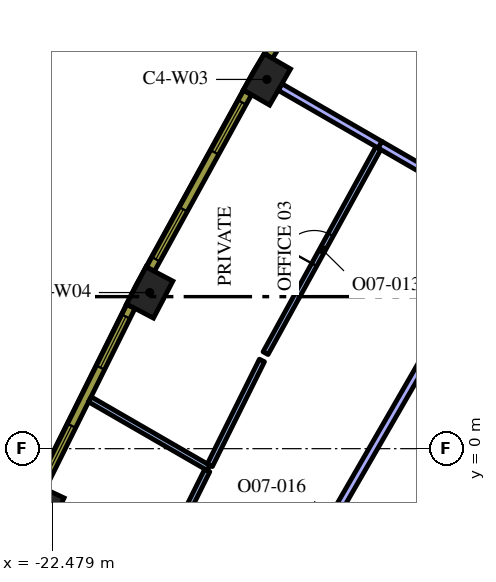
"""IFC4 building model, lengths in metres.
Left out: names, types, materials, properties, quantities, classifications, styles, units other than length and angle.
Written with IfcOpenShell. Run it as: python <this file> out.ifc"""

import sys

from ifc_helpers import new_model, si_unit, direction, frame, frame_2d, origin, origin_2d, place, context, subcontext, project, spatial, rectangle, extrude, element, fill, save


model = new_model("IFC4")
c1 = context("Model", 3, precision=1e-05, world=origin(), true_north=direction((0.0, 1.0)))
c2 = subcontext(c1, "Body", "Model", "MODEL_VIEW")
j1 = project(units=[si_unit("LENGTHUNIT", "METRE"), si_unit("PLANEANGLEUNIT", "RADIAN")], contexts=[c1])
p1 = place(None, origin())
s1 = spatial("IfcSite", under=j1, at=p1, CompositionType="ELEMENT")
p2 = place(p1, origin())
s2 = spatial("IfcBuilding", under=s1, at=p2, CompositionType="ELEMENT")
p3 = place(p2, frame((0.0, 0.0, 222.6)))
s3 = spatial("IfcBuildingStorey", under=s2, at=p3, CompositionType="ELEMENT", Elevation=222.6)
for number, where, z_axis, x_axis in (
    (1, (-16.827, 9.715, 0.0), (0.0, 0.0, 1.0), (-0.5, -0.866, 0.0)),
    (2, (-19.912, 4.108, 0.0), (0.0, 0.0, 1.0), (-0.464, -0.886, 0.0)),
    (3, (-22.76, -1.623, 0.0), (0.0, 0.0, 1.0), (-0.426, -0.905, 0.0)),
):
    element("IfcColumn", number, at=place(p3, frame(where, z_axis=z_axis, x_axis=x_axis)), inside=s3, PredefinedType="COLUMN", context=c2, shape_type="SweptSolid", body=[
        extrude(rectangle(XDim=1.1, YDim=0.8, at=origin_2d()), origin(), (0.0, 0.0, 1.0), 4.2),
    ])
p4 = place(p3, frame((-12.625, -1.867, 0.0), z_axis=(0.0, 0.0, 1.0), x_axis=(0.500008520515, 0.866020484407, 0.0)))
e4 = element("IfcWall", 4, at=p4, inside=s3, PredefinedType="SOLIDWALL", context=c2, shape_type="SweptSolid", body=[
    extrude(rectangle(XDim=15.859, YDim=0.7, at=frame_2d((7.929, 0.0))), origin(), (0.0, 0.0, 1.0), 4.2),
])
p5 = place(p3, frame((-13.844, 7.993, 0.0), z_axis=(0.0, 0.0, 1.0), x_axis=(-0.866003976688, 0.500037110984, 0.0)))
e5 = element("IfcWall", 5, at=p5, inside=s3, PredefinedType="PARTITIONING", context=c2, shape_type="SweptSolid", body=[
    extrude(rectangle(XDim=3.045, YDim=0.2, at=frame_2d((1.522, 0.0))), origin(), (0.0, 0.0, 1.0), 3.45),
])
p6 = place(p3, frame((-10.522, 6.075, 0.0), z_axis=(0.0, 0.0, 1.0), x_axis=(-0.866002601515, 0.500039492609, 0.0)))
e6 = element("IfcWall", 6, at=p6, inside=s3, PredefinedType="PARTITIONING", context=c2, shape_type="SweptSolid", body=[
    extrude(rectangle(XDim=3.844, YDim=0.2, at=frame_2d((1.922, 0.0))), origin(), (0.0, 0.0, 1.0), 3.45),
])
p7 = place(p3, frame((-18.363, -0.506, 0.0), z_axis=(0.0, 0.0, 1.0), x_axis=(-0.866048087663, 0.499960708312, 0.0)))
e7 = element("IfcWall", 7, at=p7, inside=s3, PredefinedType="PARTITIONING", context=c2, shape_type="SweptSolid", body=[
    extrude(rectangle(XDim=3.607, YDim=0.15, at=frame_2d((1.804, 0.0))), origin(), (0.0, 0.0, 1.0), 3.45),
])
p8 = place(p3, frame((-16.863, 2.513, 0.0), z_axis=(0.0, 0.0, 1.0), x_axis=(0.48192483879, 0.876212559689, 0.0)))
e8 = element("IfcWall", 8, at=p8, inside=s3, PredefinedType="PARTITIONING", context=c2, shape_type="SweptSolid", body=[
    extrude(rectangle(XDim=6.157, YDim=0.15, at=frame_2d((3.078, 0.0))), origin(), (0.0, 0.0, 1.0), 3.45),
])
p9 = place(p8, frame((2.657, 0.0, 0.0)))
e9 = element("IfcOpeningElement", 9, at=p9, cuts=e8, PredefinedType="OPENING", context=c2, shape_type="SweptSolid", body=[
    extrude(rectangle(XDim=0.9, YDim=2.1, at=frame_2d((0.45, 1.05))), frame((0.0, 0.085, 0.0), z_axis=(0.0, -1.0, 0.0), x_axis=(1.0, 0.0, 0.0)), (0.0, 0.0, 1.0), 0.17),
])
p10 = place(p3, frame((-16.958, 2.321, 0.0), z_axis=(0.0, 0.0, 1.0), x_axis=(-0.445184199442, -0.895439014432, 0.0)))
e10 = element("IfcWall", 10, at=p10, inside=s3, PredefinedType="PARTITIONING", context=c2, shape_type="SweptSolid", body=[
    extrude(rectangle(XDim=3.082, YDim=0.15, at=frame_2d((1.541, 0.0))), origin(), (0.0, 0.0, 1.0), 3.45),
])
p11 = place(p3, frame((-18.397, -0.573, 0.0), z_axis=(0.0, 0.0, 1.0), x_axis=(-0.445162501923, -0.89544980143, 0.0)))
e11 = element("IfcWall", 11, at=p11, inside=s3, PredefinedType="PARTITIONING", context=c2, shape_type="SweptSolid", body=[
    extrude(rectangle(XDim=2.811, YDim=0.15, at=frame_2d((1.405, 0.0))), origin(), (0.0, 0.0, 1.0), 3.45),
])
p12 = place(p3, frame((-12.537, 2.585, 0.0), z_axis=(0.0, 0.0, 1.0), x_axis=(-0.500002393198, -0.866024022066, 0.0)))
e12 = element("IfcWall", 12, at=p12, inside=s3, PredefinedType="PARTITIONING", context=c2, shape_type="SweptSolid", body=[
    extrude(rectangle(XDim=10.317, YDim=0.2, at=frame_2d((5.159, 0.0))), origin(), (0.0, 0.0, 1.0), 3.45),
])
p13 = place(p12, frame((4.7, 0.0, 0.0)))
e13 = element("IfcOpeningElement", 13, at=p13, cuts=e12, PredefinedType="OPENING", context=c2, shape_type="SweptSolid", body=[
    extrude(rectangle(XDim=1.0, YDim=2.1, at=frame_2d((0.5, 1.05))), frame((0.0, 0.11, 0.0), z_axis=(0.0, -1.0, 0.0), x_axis=(1.0, 0.0, 0.0)), (0.0, 0.0, 1.0), 0.22),
])
p14 = place(p3, frame((-14.038, 14.864, 0.0), z_axis=(0.0, 0.0, 1.0), x_axis=(-0.517846166225, -0.855473756538, 0.0)))
e14 = element("IfcWall", 14, at=p14, inside=s3, PredefinedType="SOLIDWALL", context=c2, shape_type="SweptSolid", body=[
    extrude(rectangle(XDim=5.298, YDim=0.24, at=frame_2d((2.649, 0.0))), origin(), (0.0, 0.0, 1.0), 3.95),
])
p15 = place(p14, frame((0.294, 0.0, 0.9)))
e15 = element("IfcOpeningElement", 15, at=p15, cuts=e14, PredefinedType="OPENING", context=c2, shape_type="SweptSolid", body=[
    extrude(rectangle(XDim=1.5, YDim=2.55, at=frame_2d((0.75, 1.275))), frame((0.0, 0.13, 0.0), z_axis=(0.0, -1.0, 0.0), x_axis=(1.0, 0.0, 0.0)), (0.0, 0.0, 1.0), 0.26),
])
p16 = place(p14, frame((3.504, 0.0, 0.9)))
e16 = element("IfcOpeningElement", 16, at=p16, cuts=e14, PredefinedType="OPENING", context=c2, shape_type="SweptSolid", body=[
    extrude(rectangle(XDim=1.5, YDim=2.55, at=frame_2d((0.75, 1.275))), frame((0.0, 0.13, 0.0), z_axis=(0.0, -1.0, 0.0), x_axis=(1.0, 0.0, 0.0)), (0.0, 0.0, 1.0), 0.26),
])
p17 = place(p3, frame((-17.338, 9.368, 0.0), z_axis=(0.0, 0.0, 1.0), x_axis=(-0.481925825015, -0.876212017256, 0.0)))
e17 = element("IfcWall", 17, at=p17, inside=s3, PredefinedType="SOLIDWALL", context=c2, shape_type="SweptSolid", body=[
    extrude(rectangle(XDim=5.299, YDim=0.24, at=frame_2d((2.649, 0.0))), origin(), (0.0, 0.0, 1.0), 3.95),
])
p18 = place(p17, frame((0.295, 0.0, 0.9)))
e18 = element("IfcOpeningElement", 18, at=p18, cuts=e17, PredefinedType="OPENING", context=c2, shape_type="SweptSolid", body=[
    extrude(rectangle(XDim=1.5, YDim=2.55, at=frame_2d((0.75, 1.275))), frame((0.0, 0.13, 0.0), z_axis=(0.0, -1.0, 0.0), x_axis=(1.0, 0.0, 0.0)), (0.0, 0.0, 1.0), 0.26),
])
p19 = place(p17, frame((3.504, 0.0, 0.9)))
e19 = element("IfcOpeningElement", 19, at=p19, cuts=e17, PredefinedType="OPENING", context=c2, shape_type="SweptSolid", body=[
    extrude(rectangle(XDim=1.5, YDim=2.55, at=frame_2d((0.75, 1.275))), frame((0.0, 0.13, 0.0), z_axis=(0.0, -1.0, 0.0), x_axis=(1.0, 0.0, 0.0)), (0.0, 0.0, 1.0), 0.26),
])
p20 = place(p3, frame((-20.407, 3.74, 0.0), z_axis=(0.0, 0.0, 1.0), x_axis=(-0.445129582031, -0.895466166419, 0.0)))
e20 = element("IfcWall", 20, at=p20, inside=s3, PredefinedType="SOLIDWALL", context=c2, shape_type="SweptSolid", body=[
    extrude(rectangle(XDim=5.298, YDim=0.24, at=frame_2d((2.649, 0.0))), origin(), (0.0, 0.0, 1.0), 3.95),
])
p21 = place(p20, frame((0.295, 0.0, 0.9)))
e21 = element("IfcOpeningElement", 21, at=p21, cuts=e20, PredefinedType="OPENING", context=c2, shape_type="SweptSolid", body=[
    extrude(rectangle(XDim=1.5, YDim=2.55, at=frame_2d((0.75, 1.275))), frame((0.0, 0.13, 0.0), z_axis=(0.0, -1.0, 0.0), x_axis=(1.0, 0.0, 0.0)), (0.0, 0.0, 1.0), 0.26),
])
p22 = place(p20, frame((3.504, 0.0, 0.9)))
e22 = element("IfcOpeningElement", 22, at=p22, cuts=e20, PredefinedType="OPENING", context=c2, shape_type="SweptSolid", body=[
    extrude(rectangle(XDim=1.5, YDim=2.55, at=frame_2d((0.75, 1.275))), frame((0.0, 0.13, 0.0), z_axis=(0.0, -1.0, 0.0), x_axis=(1.0, 0.0, 0.0)), (0.0, 0.0, 1.0), 0.26),
])
p23 = place(p9, origin())
e23 = element("IfcDoor", 23, at=p23, inside=s3, OperationType="SINGLE_SWING_RIGHT", PredefinedType="DOOR", context=c2, shape_type="SweptSolid", body=[
    extrude(rectangle(XDim=0.9, YDim=2.1, at=frame_2d((0.45, 1.05))), frame((0.0, 0.025, 0.0), z_axis=(0.0, -1.0, 0.0), x_axis=(1.0, 0.0, 0.0)), (0.0, 0.0, 1.0), 0.05),
])
fill(e9, e23)
p24 = place(p18, origin())
e24 = element("IfcWindow", 24, at=p24, inside=s3, PartitioningType="SINGLE_PANEL", PredefinedType="WINDOW", context=c2, shape_type="SweptSolid", body=[
    extrude(rectangle(XDim=1.5, YDim=2.55, at=frame_2d((0.75, 1.275))), frame((0.0, 0.04, 0.0), z_axis=(0.0, -1.0, 0.0), x_axis=(1.0, 0.0, 0.0)), (0.0, 0.0, 1.0), 0.06),
])
fill(e18, e24)
p25 = place(p19, origin())
e25 = element("IfcWindow", 25, at=p25, inside=s3, PartitioningType="SINGLE_PANEL", PredefinedType="WINDOW", context=c2, shape_type="SweptSolid", body=[
    extrude(rectangle(XDim=1.5, YDim=2.55, at=frame_2d((0.75, 1.275))), frame((0.0, 0.04, 0.0), z_axis=(0.0, -1.0, 0.0), x_axis=(1.0, 0.0, 0.0)), (0.0, 0.0, 1.0), 0.06),
])
fill(e19, e25)
p26 = place(p21, origin())
e26 = element("IfcWindow", 26, at=p26, inside=s3, PartitioningType="SINGLE_PANEL", PredefinedType="WINDOW", context=c2, shape_type="SweptSolid", body=[
    extrude(rectangle(XDim=1.5, YDim=2.55, at=frame_2d((0.75, 1.275))), frame((0.0, 0.04, 0.0), z_axis=(0.0, -1.0, 0.0), x_axis=(1.0, 0.0, 0.0)), (0.0, 0.0, 1.0), 0.06),
])
fill(e21, e26)
p27 = place(p22, origin())
e27 = element("IfcWindow", 27, at=p27, inside=s3, PartitioningType="SINGLE_PANEL", PredefinedType="WINDOW", context=c2, shape_type="SweptSolid", body=[
    extrude(rectangle(XDim=1.5, YDim=2.55, at=frame_2d((0.75, 1.275))), frame((0.0, 0.04, 0.0), z_axis=(0.0, -1.0, 0.0), x_axis=(1.0, 0.0, 0.0)), (0.0, 0.0, 1.0), 0.06),
])
fill(e22, e27)
save(model, sys.argv[1])
